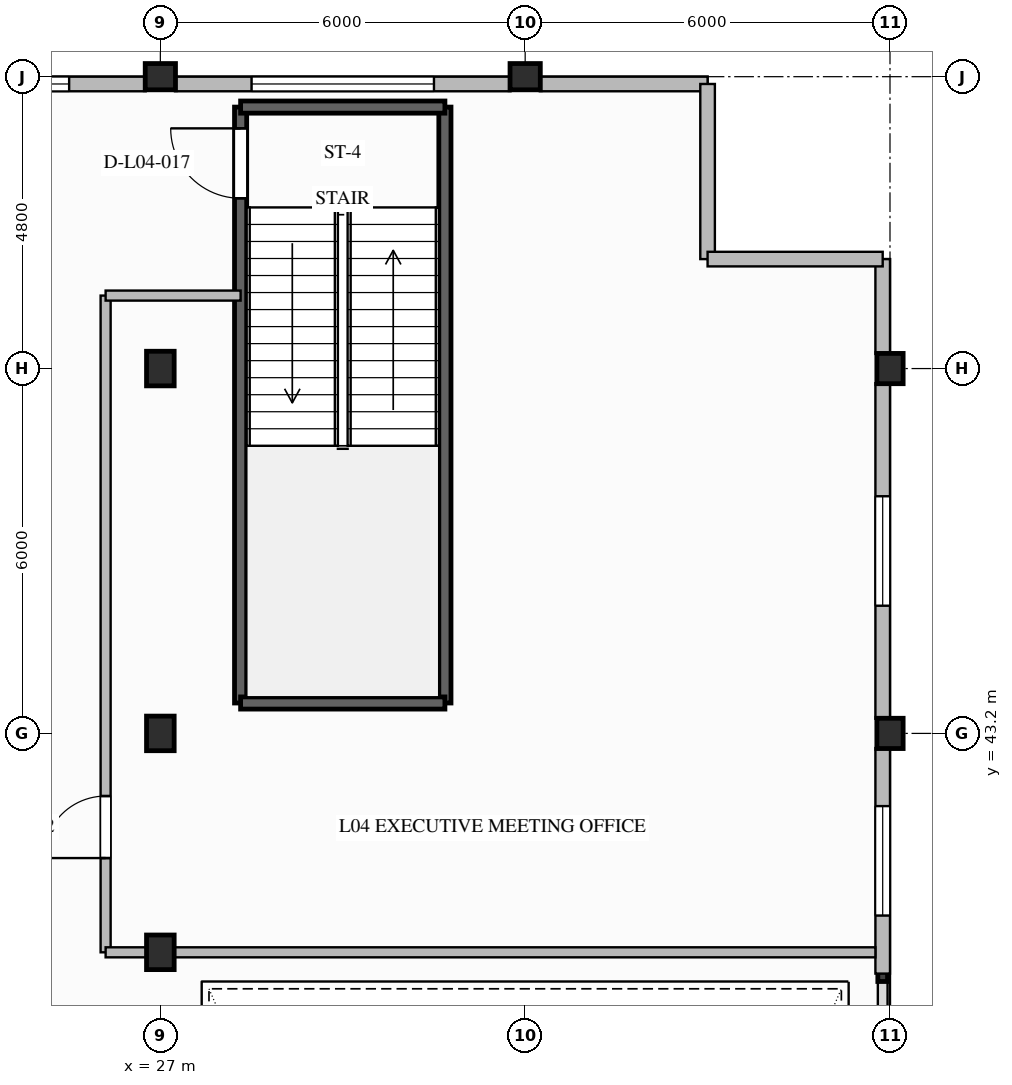
"""IFC4 building model, lengths in metres.
Left out: names, types, materials, properties, quantities, classifications, styles, units other than length and angle.
Written with IfcOpenShell. Run it as: python <this file> out.ifc"""

import sys

from ifc_helpers import new_model, si_unit, direction, frame, frame_2d, origin, origin_2d, place, context, subcontext, project, spatial, rectangle, i_section, extrude, element, fill, save


model = new_model("IFC4")
c1 = context("Model", 3, precision=1e-05, world=origin(), true_north=direction((0.0, 1.0)))
c2 = subcontext(c1, "Body", "Model", "MODEL_VIEW")
j1 = project(units=[si_unit("LENGTHUNIT", "METRE"), si_unit("PLANEANGLEUNIT", "RADIAN")], contexts=[c1])
p1 = place(None, origin())
s1 = spatial("IfcSite", under=j1, at=p1, CompositionType="ELEMENT")
p2 = place(p1, origin())
s2 = spatial("IfcBuilding", under=s1, at=p2, CompositionType="ELEMENT")
p3 = place(p2, frame((0.0, 0.0, 22.4)))
s3 = spatial("IfcBuildingStorey", under=s2, at=p3, CompositionType="ELEMENT", Elevation=22.4)
for number, where, z_axis, x_axis in (
    (1, (39.0, 43.2, 0.0), (0.0, 0.0, 1.0), (1.0, 0.0, 0.0)),
    (2, (39.0, 49.2, 0.0), (0.0, 0.0, 1.0), (1.0, 0.0, 0.0)),
    (3, (27.0, 54.0, 0.0), (0.0, 0.0, 1.0), (0.0, 1.0, 0.0)),
    (4, (33.0, 54.0, 0.0), (0.0, 0.0, 1.0), (0.0, 1.0, 0.0)),
):
    element("IfcColumn", number, at=place(p3, frame(where, z_axis=z_axis, x_axis=x_axis)), inside=s3, PredefinedType="COLUMN", context=c2, shape_type="SweptSolid", body=[
        extrude(i_section(OverallWidth=0.432, OverallDepth=0.498, WebThickness=0.056, FlangeThickness=0.089, FilletRadius=0.03, at=origin_2d()), origin(), (0.0, 0.0, 1.0), 5.2),
    ])
for number, where, z_axis, x_axis in (
    (5, (27.0, 39.6, 0.0), (0.0, 0.0, 1.0), (1.0, 0.0, 0.0)),
    (6, (27.0, 43.2, 0.0), (0.0, 0.0, 1.0), (1.0, 0.0, 0.0)),
    (7, (27.0, 49.2, 0.0), (0.0, 0.0, 1.0), (1.0, 0.0, 0.0)),
):
    element("IfcColumn", number, at=place(p3, frame(where, z_axis=z_axis, x_axis=x_axis)), inside=s3, PredefinedType="COLUMN", context=c2, shape_type="SweptSolid", body=[
        extrude(i_section(OverallWidth=0.454, OverallDepth=0.569, WebThickness=0.078, FlangeThickness=0.125, FilletRadius=0.03, at=origin_2d()), origin(), (0.0, 0.0, 1.0), 5.2),
    ])
p4 = place(p3, frame((38.88, 42.959, 0.0), z_axis=(0.0, 0.0, 1.0), x_axis=(0.0, -1.0, 0.0)))
e8 = element("IfcWall", 8, at=p4, inside=s3, PredefinedType="STANDARD", context=c2, shape_type="SweptSolid", body=[
    extrude(rectangle(XDim=3.709, YDim=0.24, at=frame_2d((1.854, 0.0))), origin(), (0.0, 0.0, 1.0), 4.155),
])
p5 = place(p4, frame((0.955, 0.0, 0.85)))
e9 = element("IfcOpeningElement", 9, at=p5, cuts=e8, PredefinedType="OPENING", context=c2, shape_type="SweptSolid", body=[
    extrude(rectangle(XDim=1.8, YDim=2.2, at=frame_2d((0.9, 1.1))), frame((0.0, 0.13, 0.0), z_axis=(0.0, -1.0, 0.0), x_axis=(1.0, 0.0, 0.0)), (0.0, 0.0, 1.0), 0.26),
])
p6 = place(p3, frame((38.88, 48.959, 0.0), z_axis=(0.0, 0.0, 1.0), x_axis=(0.0, -1.0, 0.0)))
e10 = element("IfcWall", 10, at=p6, inside=s3, PredefinedType="STANDARD", context=c2, shape_type="SweptSolid", body=[
    extrude(rectangle(XDim=5.518, YDim=0.24, at=frame_2d((2.759, 0.0))), origin(), (0.0, 0.0, 1.0), 4.155),
])
p7 = place(p6, frame((1.859, 0.0, 0.85)))
e11 = element("IfcOpeningElement", 11, at=p7, cuts=e10, PredefinedType="OPENING", context=c2, shape_type="SweptSolid", body=[
    extrude(rectangle(XDim=1.8, YDim=2.2, at=frame_2d((0.9, 1.1))), frame((0.0, 0.13, 0.0), z_axis=(0.0, -1.0, 0.0), x_axis=(1.0, 0.0, 0.0)), (0.0, 0.0, 1.0), 0.26),
])
p8 = place(p3, frame((38.88, 51.0, 0.0), z_axis=(0.0, 0.0, 1.0), x_axis=(0.0, -1.0, 0.0)))
e12 = element("IfcWall", 12, at=p8, inside=s3, PredefinedType="STANDARD", context=c2, shape_type="SweptSolid", body=[
    extrude(rectangle(XDim=1.559, YDim=0.24, at=frame_2d((0.78, 0.0))), origin(), (0.0, 0.0, 1.0), 4.85),
])
p9 = place(p3, frame((22.441, 53.88, 0.0), z_axis=(0.0, 0.0, 1.0), x_axis=(1.0, 0.0, 0.0)))
e13 = element("IfcWall", 13, at=p9, inside=s3, PredefinedType="STANDARD", context=c2, shape_type="SweptSolid", body=[
    extrude(rectangle(XDim=4.318, YDim=0.24, at=frame_2d((2.159, 0.0))), origin(), (0.0, 0.0, 1.0), 4.155),
])
p10 = place(p9, frame((1.259, 0.0, 0.65)))
e14 = element("IfcOpeningElement", 14, at=p10, cuts=e13, PredefinedType="OPENING", context=c2, shape_type="SweptSolid", body=[
    extrude(rectangle(XDim=1.8, YDim=2.2, at=frame_2d((0.9, 1.1))), frame((0.0, 0.13, 0.0), z_axis=(0.0, -1.0, 0.0), x_axis=(1.0, 0.0, 0.0)), (0.0, 0.0, 1.0), 0.26),
])
p11 = place(p3, frame((27.241, 53.88, 0.0), z_axis=(0.0, 0.0, 1.0), x_axis=(1.0, 0.0, 0.0)))
e15 = element("IfcWall", 15, at=p11, inside=s3, PredefinedType="STANDARD", context=c2, shape_type="SweptSolid", body=[
    extrude(rectangle(XDim=5.518, YDim=0.24, at=frame_2d((2.759, 0.0))), origin(), (0.0, 0.0, 1.0), 4.155),
])
p12 = place(p11, frame((1.259, 0.0, 0.65)))
e16 = element("IfcOpeningElement", 16, at=p12, cuts=e15, PredefinedType="OPENING", context=c2, shape_type="SweptSolid", body=[
    extrude(rectangle(XDim=3.0, YDim=2.2, at=frame_2d((1.5, 1.1))), frame((0.0, 0.13, 0.0), z_axis=(0.0, -1.0, 0.0), x_axis=(1.0, 0.0, 0.0)), (0.0, 0.0, 1.0), 0.26),
])
p13 = place(p3, frame((33.241, 53.88, 0.0), z_axis=(0.0, 0.0, 1.0), x_axis=(1.0, 0.0, 0.0)))
e17 = element("IfcWall", 17, at=p13, inside=s3, PredefinedType="STANDARD", context=c2, shape_type="SweptSolid", body=[
    extrude(rectangle(XDim=2.759, YDim=0.24, at=frame_2d((1.379, 0.0))), origin(), (0.0, 0.0, 1.0), 4.85),
])
for number, where, z_axis, x_axis in (
    (18, (36.0, 53.88, 0.0), (0.0, 0.0, 1.0), (0.0, -1.0, 0.0)),
    (19, (36.0, 51.0, 0.0), (0.0, 0.0, 1.0), (1.0, 0.0, 0.0)),
):
    element("IfcWall", number, at=place(p3, frame(where, z_axis=z_axis, x_axis=x_axis)), inside=s3, PredefinedType="STANDARD", context=c2, shape_type="SweptSolid", body=[
        extrude(rectangle(XDim=2.88, YDim=0.24, at=frame_2d((1.44, 0.0))), origin(), (0.0, 0.0, 1.0), 4.85),
    ])
p14 = place(p3, frame((28.32, 43.7, 0.0), z_axis=(0.0, 0.0, 1.0), x_axis=(0.0, 1.0, 0.0)))
e20 = element("IfcWall", 20, at=p14, inside=s3, PredefinedType="SOLIDWALL", context=c2, shape_type="SweptSolid", body=[
    extrude(rectangle(XDim=9.8, YDim=0.2, at=frame_2d((4.9, 0.0))), origin(), (0.0, 0.0, 1.0), 4.85),
])
p15 = place(p14, frame((8.3, 0.0, 0.0)))
e21 = element("IfcOpeningElement", 21, at=p15, cuts=e20, PredefinedType="OPENING", context=c2, shape_type="SweptSolid", body=[
    extrude(rectangle(XDim=1.15, YDim=2.15, at=frame_2d((0.575, 1.075))), frame((0.0, 0.11, 0.0), z_axis=(0.0, -1.0, 0.0), x_axis=(1.0, 0.0, 0.0)), (0.0, 0.0, 1.0), 0.22),
])
p16 = place(p3, frame((31.68, 53.5, 0.0), z_axis=(0.0, 0.0, 1.0), x_axis=(0.0, -1.0, 0.0)))
e22 = element("IfcWall", 22, at=p16, inside=s3, PredefinedType="SOLIDWALL", context=c2, shape_type="SweptSolid", body=[
    extrude(rectangle(XDim=9.8, YDim=0.2, at=frame_2d((4.9, 0.0))), origin(), (0.0, 0.0, 1.0), 4.85),
])
for number, where, z_axis, x_axis in (
    (23, (28.32, 43.7, 0.0), (0.0, 0.0, 1.0), (1.0, 0.0, 0.0)),
    (24, (31.68, 53.5, 0.0), (0.0, 0.0, 1.0), (-1.0, 0.0, 0.0)),
):
    element("IfcWall", number, at=place(p3, frame(where, z_axis=z_axis, x_axis=x_axis)), inside=s3, PredefinedType="SOLIDWALL", context=c2, shape_type="SweptSolid", body=[
        extrude(rectangle(XDim=3.36, YDim=0.2, at=frame_2d((1.68, 0.0))), origin(), (0.0, 0.0, 1.0), 4.85),
    ])
p17 = place(p3, frame((26.1, 39.6, 0.0), z_axis=(0.0, 0.0, 1.0), x_axis=(0.0, 1.0, 0.0)))
e25 = element("IfcWall", 25, at=p17, inside=s3, PredefinedType="PARTITIONING", context=c2, shape_type="SweptSolid", body=[
    extrude(rectangle(XDim=10.8, YDim=0.165, at=frame_2d((5.4, 0.0))), origin(), (0.0, 0.0, 1.0), 4.85),
])
p18 = place(p17, frame((1.55, 0.0, 0.0)))
e26 = element("IfcOpeningElement", 26, at=p18, cuts=e25, PredefinedType="OPENING", context=c2, shape_type="SweptSolid", body=[
    extrude(rectangle(XDim=1.02, YDim=2.15, at=frame_2d((0.51, 1.075))), frame((0.0, 0.093, 0.0), z_axis=(0.0, -1.0, 0.0), x_axis=(1.0, 0.0, 0.0)), (0.0, 0.0, 1.0), 0.185),
])
p19 = place(p3, frame((26.1, 50.4, 0.0), z_axis=(0.0, 0.0, 1.0), x_axis=(1.0, 0.0, 0.0)))
e27 = element("IfcWall", 27, at=p19, inside=s3, PredefinedType="PARTITIONING", context=c2, shape_type="SweptSolid", body=[
    extrude(rectangle(XDim=2.22, YDim=0.165, at=frame_2d((1.11, 0.0))), origin(), (0.0, 0.0, 1.0), 4.85),
])
p20 = place(p3, frame((26.1, 39.6, 0.0), z_axis=(0.0, 0.0, 1.0), x_axis=(1.0, 0.0, 0.0)))
e28 = element("IfcWall", 28, at=p20, inside=s3, PredefinedType="PARTITIONING", context=c2, shape_type="SweptSolid", body=[
    extrude(rectangle(XDim=12.66, YDim=0.165, at=frame_2d((6.33, 0.0))), origin(), (0.0, 0.0, 1.0), 4.375),
])
p21 = place(p5, origin())
e29 = element("IfcWindow", 29, at=p21, inside=s3, PartitioningType="SINGLE_PANEL", PredefinedType="WINDOW", context=c2, shape_type="SweptSolid", body=[
    extrude(rectangle(XDim=1.8, YDim=2.2, at=frame_2d((0.9, 1.1))), frame((0.0, 0.03, 0.0), z_axis=(0.0, -1.0, 0.0), x_axis=(1.0, 0.0, 0.0)), (0.0, 0.0, 1.0), 0.06),
])
fill(e9, e29)
p22 = place(p7, origin())
e30 = element("IfcWindow", 30, at=p22, inside=s3, PartitioningType="SINGLE_PANEL", PredefinedType="WINDOW", context=c2, shape_type="SweptSolid", body=[
    extrude(rectangle(XDim=1.8, YDim=2.2, at=frame_2d((0.9, 1.1))), frame((0.0, 0.03, 0.0), z_axis=(0.0, -1.0, 0.0), x_axis=(1.0, 0.0, 0.0)), (0.0, 0.0, 1.0), 0.06),
])
fill(e11, e30)
p23 = place(p10, origin())
e31 = element("IfcWindow", 31, at=p23, inside=s3, PartitioningType="SINGLE_PANEL", PredefinedType="WINDOW", context=c2, shape_type="SweptSolid", body=[
    extrude(rectangle(XDim=1.8, YDim=2.2, at=frame_2d((0.9, 1.1))), frame((0.0, 0.03, 0.0), z_axis=(0.0, -1.0, 0.0), x_axis=(1.0, 0.0, 0.0)), (0.0, 0.0, 1.0), 0.06),
])
fill(e14, e31)
p24 = place(p12, origin())
e32 = element("IfcWindow", 32, at=p24, inside=s3, PartitioningType="SINGLE_PANEL", PredefinedType="WINDOW", context=c2, shape_type="SweptSolid", body=[
    extrude(rectangle(XDim=3.0, YDim=2.2, at=frame_2d((1.5, 1.1))), frame((0.0, 0.03, 0.0), z_axis=(0.0, -1.0, 0.0), x_axis=(1.0, 0.0, 0.0)), (0.0, 0.0, 1.0), 0.06),
])
fill(e16, e32)
p25 = place(p15, origin())
e33 = element("IfcDoor", 33, at=p25, inside=s3, OperationType="SINGLE_SWING_RIGHT", PredefinedType="DOOR", context=c2, shape_type="SweptSolid", body=[
    extrude(rectangle(XDim=1.15, YDim=2.15, at=frame_2d((0.575, 1.075))), frame((0.0, 0.025, 0.0), z_axis=(0.0, -1.0, 0.0), x_axis=(1.0, 0.0, 0.0)), (0.0, 0.0, 1.0), 0.05),
])
fill(e21, e33)
p26 = place(p18, origin())
e34 = element("IfcDoor", 34, at=p26, inside=s3, OperationType="SINGLE_SWING_LEFT", PredefinedType="DOOR", context=c2, shape_type="SweptSolid", body=[
    extrude(rectangle(XDim=1.02, YDim=2.15, at=frame_2d((0.51, 1.075))), frame((0.0, 0.025, 0.0), z_axis=(0.0, -1.0, 0.0), x_axis=(1.0, 0.0, 0.0)), (0.0, 0.0, 1.0), 0.05),
])
fill(e26, e34)
save(model, sys.argv[1])
